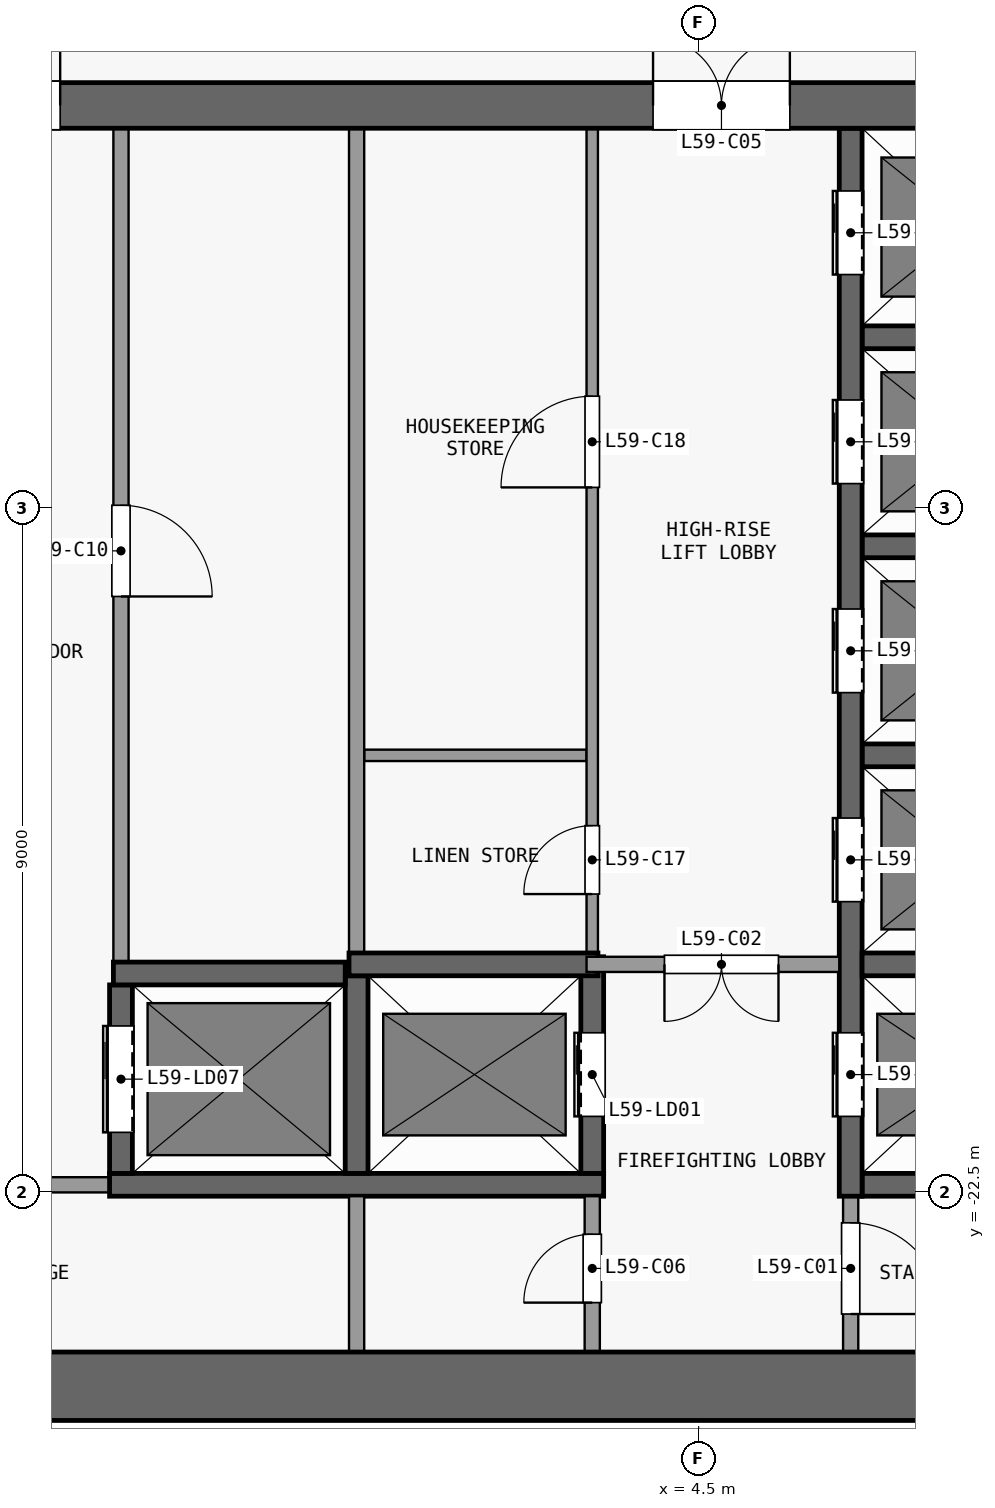
"""IFC4 building model, lengths in metres.
Left out: names, types, materials, properties, quantities, classifications, styles, units other than length and angle.
Written with IfcOpenShell. Run it as: python <this file> out.ifc"""

import sys

from ifc_helpers import new_model, si_unit, direction, frame, frame_2d, origin, place, context, subcontext, project, spatial, rectangle, extrude, element, fill, save


model = new_model("IFC4")
c1 = context("Model", 3, precision=1e-05, world=origin(), true_north=direction((0.0, 1.0)))
c2 = subcontext(c1, "Body", "Model", "MODEL_VIEW")
j1 = project(units=[si_unit("LENGTHUNIT", "METRE"), si_unit("PLANEANGLEUNIT", "RADIAN")], contexts=[c1])
p1 = place(None, origin())
s1 = spatial("IfcSite", under=j1, at=p1, CompositionType="ELEMENT")
p2 = place(p1, origin())
s2 = spatial("IfcBuilding", under=s1, at=p2, CompositionType="ELEMENT")
p3 = place(p2, frame((0.0, 0.0, 233.9)))
s3 = spatial("IfcBuildingStorey", under=s2, at=p3, CompositionType="ELEMENT", Elevation=233.9)
p4 = place(p3, frame((-13.2, -25.05, 0.0), z_axis=(0.0, 0.0, 1.0), x_axis=(1.0, 0.0, 0.0)))
e1 = element("IfcWall", 1, at=p4, inside=s3, PredefinedType="SHEAR", context=c2, shape_type="SweptSolid", body=[
    extrude(rectangle(XDim=26.4, YDim=0.9, at=frame_2d((13.2, 0.0))), origin(), (0.0, 0.0, 1.0), 3.3),
])
p5 = place(p3, frame((-13.2, -8.2, 0.0), z_axis=(0.0, 0.0, 1.0), x_axis=(1.0, 0.0, 0.0)))
e2 = element("IfcWall", 2, at=p5, inside=s3, PredefinedType="SHEAR", context=c2, shape_type="SweptSolid", body=[
    extrude(rectangle(XDim=26.4, YDim=0.6, at=frame_2d((13.2, 0.0))), origin(), (0.0, 0.0, 1.0), 3.3),
])
p6 = place(p5, frame((7.5, 0.0, 0.0)))
e3 = element("IfcOpeningElement", 3, at=p6, cuts=e2, PredefinedType="OPENING", context=c2, shape_type="SweptSolid", body=[
    extrude(rectangle(XDim=1.8, YDim=2.1, at=frame_2d((0.9, 1.05))), frame((0.0, 0.31, 0.0), z_axis=(0.0, -1.0, 0.0), x_axis=(1.0, 0.0, 0.0)), (0.0, 0.0, 1.0), 0.62),
])
p7 = place(p5, frame((17.1, 0.0, 0.0)))
e4 = element("IfcOpeningElement", 4, at=p7, cuts=e2, PredefinedType="OPENING", context=c2, shape_type="SweptSolid", body=[
    extrude(rectangle(XDim=1.8, YDim=2.1, at=frame_2d((0.9, 1.05))), frame((0.0, 0.31, 0.0), z_axis=(0.0, -1.0, 0.0), x_axis=(1.0, 0.0, 0.0)), (0.0, 0.0, 1.0), 0.62),
])
p8 = place(p5, frame((2.425, 0.0, 0.0)))
e5 = element("IfcOpeningElement", 5, at=p8, cuts=e2, PredefinedType="OPENING", context=c2, shape_type="SweptSolid", body=[
    extrude(rectangle(XDim=0.9, YDim=2.1, at=frame_2d((0.45, 1.05))), frame((0.0, 0.31, 0.0), z_axis=(0.0, -1.0, 0.0), x_axis=(1.0, 0.0, 0.0)), (0.0, 0.0, 1.0), 0.62),
])
p9 = place(p5, frame((23.075, 0.0, 0.0)))
e6 = element("IfcOpeningElement", 6, at=p9, cuts=e2, PredefinedType="OPENING", context=c2, shape_type="SweptSolid", body=[
    extrude(rectangle(XDim=0.9, YDim=2.1, at=frame_2d((0.45, 1.05))), frame((0.0, 0.31, 0.0), z_axis=(0.0, -1.0, 0.0), x_axis=(1.0, 0.0, 0.0)), (0.0, 0.0, 1.0), 0.62),
])
p10 = place(p3, frame((-3.25, -22.4, 0.0), z_axis=(0.0, 0.0, 1.0), x_axis=(-1.0, 0.0, 0.0)))
e7 = element("IfcWall", 7, at=p10, inside=s3, PredefinedType="PARTITIONING", context=c2, shape_type="SweptSolid", body=[
    extrude(rectangle(XDim=6.2, YDim=0.2, at=frame_2d((3.1, 0.0))), origin(), (0.0, 0.0, 1.0), 3.3),
])
p11 = place(p10, frame((0.8, 0.0, 0.0)))
e8 = element("IfcOpeningElement", 8, at=p11, cuts=e7, PredefinedType="OPENING", context=c2, shape_type="SweptSolid", body=[
    extrude(rectangle(XDim=1.5, YDim=2.1, at=frame_2d((0.75, 1.05))), frame((0.0, 0.11, 0.0), z_axis=(0.0, -1.0, 0.0), x_axis=(1.0, 0.0, 0.0)), (0.0, 0.0, 1.0), 0.22),
])
p12 = place(p3, frame((-3.25, -22.4, 0.0), z_axis=(0.0, 0.0, 1.0), x_axis=(1.0, 0.0, 0.0)))
e9 = element("IfcWall", 9, at=p12, inside=s3, PredefinedType="SHEAR", context=c2, shape_type="SweptSolid", body=[
    extrude(rectangle(XDim=6.5, YDim=0.3, at=frame_2d((3.25, 0.0))), origin(), (0.0, 0.0, 1.0), 3.3),
])
p13 = place(p3, frame((6.65, -22.4, 0.0), z_axis=(0.0, 0.0, 1.0), x_axis=(1.0, 0.0, 0.0)))
e10 = element("IfcWall", 10, at=p13, inside=s3, PredefinedType="SHEAR", context=c2, shape_type="SweptSolid", body=[
    extrude(rectangle(XDim=2.8, YDim=0.3, at=frame_2d((1.4, 0.0))), origin(), (0.0, 0.0, 1.0), 3.3),
])
p14 = place(p3, frame((-3.2, -19.62, 0.0), z_axis=(0.0, 0.0, 1.0), x_axis=(1.0, 0.0, 0.0)))
e11 = element("IfcWall", 11, at=p14, inside=s3, PredefinedType="SHEAR", context=c2, shape_type="SweptSolid", body=[
    extrude(rectangle(XDim=3.05, YDim=0.3, at=frame_2d((1.525, 0.0))), origin(), (0.0, 0.0, 1.0), 3.3),
])
p15 = place(p3, frame((-0.1, -19.5, 0.0), z_axis=(0.0, 0.0, 1.0), x_axis=(1.0, 0.0, 0.0)))
e12 = element("IfcWall", 12, at=p15, inside=s3, PredefinedType="SHEAR", context=c2, shape_type="SweptSolid", body=[
    extrude(rectangle(XDim=3.275, YDim=0.3, at=frame_2d((1.638, 0.0))), origin(), (0.0, 0.0, 1.0), 3.3),
])
p16 = place(p3, frame((6.35, -19.5, 0.0), z_axis=(0.0, 0.0, 1.0), x_axis=(-1.0, 0.0, 0.0)))
e13 = element("IfcWall", 13, at=p16, inside=s3, PredefinedType="PARTITIONING", context=c2, shape_type="SweptSolid", body=[
    extrude(rectangle(XDim=3.325, YDim=0.2, at=frame_2d((1.663, 0.0))), origin(), (0.0, 0.0, 1.0), 3.3),
])
p17 = place(p16, frame((0.8, 0.0, 0.0)))
e14 = element("IfcOpeningElement", 14, at=p17, cuts=e13, PredefinedType="OPENING", context=c2, shape_type="SweptSolid", body=[
    extrude(rectangle(XDim=1.5, YDim=2.1, at=frame_2d((0.75, 1.05))), frame((0.0, 0.11, 0.0), z_axis=(0.0, -1.0, 0.0), x_axis=(1.0, 0.0, 0.0)), (0.0, 0.0, 1.0), 0.22),
])
p18 = place(p3, frame((6.65, -19.5, 0.0), z_axis=(0.0, 0.0, 1.0), x_axis=(1.0, 0.0, 0.0)))
e15 = element("IfcWall", 15, at=p18, inside=s3, PredefinedType="SHEAR", context=c2, shape_type="SweptSolid", body=[
    extrude(rectangle(XDim=2.8, YDim=0.3, at=frame_2d((1.4, 0.0))), origin(), (0.0, 0.0, 1.0), 3.3),
])
p19 = place(p3, frame((0.1, -16.75, 0.0), z_axis=(0.0, 0.0, 1.0), x_axis=(1.0, 0.0, 0.0)))
e16 = element("IfcWall", 16, at=p19, inside=s3, PredefinedType="PARTITIONING", context=c2, shape_type="SweptSolid", body=[
    extrude(rectangle(XDim=2.925, YDim=0.15, at=frame_2d((1.462, 0.0))), origin(), (0.0, 0.0, 1.0), 3.3),
])
for number, where, z_axis, x_axis in (
    (17, (6.65, -16.75, 0.0), (0.0, 0.0, 1.0), (1.0, 0.0, 0.0)),
    (18, (6.65, -14.0, 0.0), (0.0, 0.0, 1.0), (1.0, 0.0, 0.0)),
    (19, (6.65, -11.25, 0.0), (0.0, 0.0, 1.0), (1.0, 0.0, 0.0)),
):
    element("IfcWall", number, at=place(p3, frame(where, z_axis=z_axis, x_axis=x_axis)), inside=s3, PredefinedType="SHEAR", context=c2, shape_type="SweptSolid", body=[
        extrude(rectangle(XDim=2.8, YDim=0.3, at=frame_2d((1.4, 0.0))), origin(), (0.0, 0.0, 1.0), 3.3),
    ])
p20 = place(p3, frame((-3.1, -22.25, 0.0), z_axis=(0.0, 0.0, 1.0), x_axis=(0.0, 1.0, 0.0)))
e20 = element("IfcWall", 20, at=p20, inside=s3, PredefinedType="SHEAR", context=c2, shape_type="SweptSolid", body=[
    extrude(rectangle(XDim=2.48, YDim=0.3, at=frame_2d((1.24, 0.0))), origin(), (0.0, 0.0, 1.0), 3.3),
])
p21 = place(p20, frame((0.54, 0.0, 0.0)))
e21 = element("IfcOpeningElement", 21, at=p21, cuts=e20, PredefinedType="OPENING", context=c2, shape_type="SweptSolid", body=[
    extrude(rectangle(XDim=1.4, YDim=2.1, at=frame_2d((0.7, 1.05))), frame((0.0, 0.16, 0.0), z_axis=(0.0, -1.0, 0.0), x_axis=(1.0, 0.0, 0.0)), (0.0, 0.0, 1.0), 0.32),
])
p22 = place(p3, frame((-3.1, -8.5, 0.0), z_axis=(0.0, 0.0, 1.0), x_axis=(0.0, -1.0, 0.0)))
e22 = element("IfcWall", 22, at=p22, inside=s3, PredefinedType="PARTITIONING", context=c2, shape_type="SweptSolid", body=[
    extrude(rectangle(XDim=10.97, YDim=0.2, at=frame_2d((5.485, 0.0))), origin(), (0.0, 0.0, 1.0), 3.3),
])
p23 = place(p22, frame((4.96, 0.0, 0.0)))
e23 = element("IfcOpeningElement", 23, at=p23, cuts=e22, PredefinedType="OPENING", context=c2, shape_type="SweptSolid", body=[
    extrude(rectangle(XDim=1.2, YDim=2.1, at=frame_2d((0.6, 1.05))), frame((0.0, 0.11, 0.0), z_axis=(0.0, -1.0, 0.0), x_axis=(1.0, 0.0, 0.0)), (0.0, 0.0, 1.0), 0.22),
])
p24 = place(p3, frame((0.0, -24.6, 0.0), z_axis=(0.0, 0.0, 1.0), x_axis=(0.0, 1.0, 0.0)))
e24 = element("IfcWall", 24, at=p24, inside=s3, PredefinedType="PARTITIONING", context=c2, shape_type="SweptSolid", body=[
    extrude(rectangle(XDim=2.05, YDim=0.2, at=frame_2d((1.025, 0.0))), origin(), (0.0, 0.0, 1.0), 3.3),
])
p25 = place(p3, frame((0.0, -22.25, 0.0), z_axis=(0.0, 0.0, 1.0), x_axis=(0.0, 1.0, 0.0)))
e25 = element("IfcWall", 25, at=p25, inside=s3, PredefinedType="SHEAR", context=c2, shape_type="SweptSolid", body=[
    extrude(rectangle(XDim=2.6, YDim=0.3, at=frame_2d((1.3, 0.0))), origin(), (0.0, 0.0, 1.0), 3.3),
])
p26 = place(p3, frame((0.0, -19.35, 0.0), z_axis=(0.0, 0.0, 1.0), x_axis=(0.0, 1.0, 0.0)))
e26 = element("IfcWall", 26, at=p26, inside=s3, PredefinedType="PARTITIONING", context=c2, shape_type="SweptSolid", body=[
    extrude(rectangle(XDim=10.85, YDim=0.2, at=frame_2d((5.425, 0.0))), origin(), (0.0, 0.0, 1.0), 3.3),
])
p27 = place(p3, frame((3.1, -24.6, 0.0), z_axis=(0.0, 0.0, 1.0), x_axis=(0.0, 1.0, 0.0)))
e27 = element("IfcWall", 27, at=p27, inside=s3, PredefinedType="PARTITIONING", context=c2, shape_type="SweptSolid", body=[
    extrude(rectangle(XDim=2.05, YDim=0.2, at=frame_2d((1.025, 0.0))), origin(), (0.0, 0.0, 1.0), 3.3),
])
p28 = place(p27, frame((0.65, 0.0, 0.0)))
e28 = element("IfcOpeningElement", 28, at=p28, cuts=e27, PredefinedType="OPENING", context=c2, shape_type="SweptSolid", body=[
    extrude(rectangle(XDim=0.9, YDim=2.1, at=frame_2d((0.45, 1.05))), frame((0.0, 0.11, 0.0), z_axis=(0.0, -1.0, 0.0), x_axis=(1.0, 0.0, 0.0)), (0.0, 0.0, 1.0), 0.22),
])
p29 = place(p3, frame((3.1, -22.25, 0.0), z_axis=(0.0, 0.0, 1.0), x_axis=(0.0, 1.0, 0.0)))
e29 = element("IfcWall", 29, at=p29, inside=s3, PredefinedType="SHEAR", context=c2, shape_type="SweptSolid", body=[
    extrude(rectangle(XDim=2.85, YDim=0.3, at=frame_2d((1.425, 0.0))), origin(), (0.0, 0.0, 1.0), 3.3),
])
p30 = place(p29, frame((0.75, 0.0, 0.0)))
e30 = element("IfcOpeningElement", 30, at=p30, cuts=e29, PredefinedType="OPENING", context=c2, shape_type="SweptSolid", body=[
    extrude(rectangle(XDim=1.1, YDim=2.1, at=frame_2d((0.55, 1.05))), frame((0.0, 0.16, 0.0), z_axis=(0.0, -1.0, 0.0), x_axis=(1.0, 0.0, 0.0)), (0.0, 0.0, 1.0), 0.32),
])
p31 = place(p3, frame((3.1, -19.4, 0.0), z_axis=(0.0, 0.0, 1.0), x_axis=(0.0, 1.0, 0.0)))
e31 = element("IfcWall", 31, at=p31, inside=s3, PredefinedType="PARTITIONING", context=c2, shape_type="SweptSolid", body=[
    extrude(rectangle(XDim=10.9, YDim=0.15, at=frame_2d((5.45, 0.0))), origin(), (0.0, 0.0, 1.0), 3.3),
])
p32 = place(p31, frame((0.825, 0.0, 0.0)))
e32 = element("IfcOpeningElement", 32, at=p32, cuts=e31, PredefinedType="OPENING", context=c2, shape_type="SweptSolid", body=[
    extrude(rectangle(XDim=0.9, YDim=2.1, at=frame_2d((0.45, 1.05))), frame((0.0, 0.085, 0.0), z_axis=(0.0, -1.0, 0.0), x_axis=(1.0, 0.0, 0.0)), (0.0, 0.0, 1.0), 0.17),
])
p33 = place(p31, frame((6.175, 0.0, 0.0)))
e33 = element("IfcOpeningElement", 33, at=p33, cuts=e31, PredefinedType="OPENING", context=c2, shape_type="SweptSolid", body=[
    extrude(rectangle(XDim=1.2, YDim=2.1, at=frame_2d((0.6, 1.05))), frame((0.0, 0.085, 0.0), z_axis=(0.0, -1.0, 0.0), x_axis=(1.0, 0.0, 0.0)), (0.0, 0.0, 1.0), 0.17),
])
p34 = place(p3, frame((6.5, -22.55, 0.0), z_axis=(0.0, 0.0, 1.0), x_axis=(0.0, -1.0, 0.0)))
e34 = element("IfcWall", 34, at=p34, inside=s3, PredefinedType="PARTITIONING", context=c2, shape_type="SweptSolid", body=[
    extrude(rectangle(XDim=2.05, YDim=0.2, at=frame_2d((1.025, 0.0))), origin(), (0.0, 0.0, 1.0), 3.3),
])
p35 = place(p34, frame((0.35, 0.0, 0.0)))
e35 = element("IfcOpeningElement", 35, at=p35, cuts=e34, PredefinedType="OPENING", context=c2, shape_type="SweptSolid", body=[
    extrude(rectangle(XDim=1.2, YDim=2.1, at=frame_2d((0.6, 1.05))), frame((0.0, 0.11, 0.0), z_axis=(0.0, -1.0, 0.0), x_axis=(1.0, 0.0, 0.0)), (0.0, 0.0, 1.0), 0.22),
])
p36 = place(p3, frame((6.5, -22.55, 0.0), z_axis=(0.0, 0.0, 1.0), x_axis=(0.0, 1.0, 0.0)))
e36 = element("IfcWall", 36, at=p36, inside=s3, PredefinedType="SHEAR", context=c2, shape_type="SweptSolid", body=[
    extrude(rectangle(XDim=14.05, YDim=0.3, at=frame_2d((7.025, 0.0))), origin(), (0.0, 0.0, 1.0), 3.3),
])
p37 = place(p36, frame((1.05, 0.0, 0.0)))
e37 = element("IfcOpeningElement", 37, at=p37, cuts=e36, PredefinedType="OPENING", context=c2, shape_type="SweptSolid", body=[
    extrude(rectangle(XDim=1.1, YDim=2.1, at=frame_2d((0.55, 1.05))), frame((0.0, 0.16, 0.0), z_axis=(0.0, -1.0, 0.0), x_axis=(1.0, 0.0, 0.0)), (0.0, 0.0, 1.0), 0.32),
])
p38 = place(p36, frame((3.875, 0.0, 0.0)))
e38 = element("IfcOpeningElement", 38, at=p38, cuts=e36, PredefinedType="OPENING", context=c2, shape_type="SweptSolid", body=[
    extrude(rectangle(XDim=1.1, YDim=2.1, at=frame_2d((0.55, 1.05))), frame((0.0, 0.16, 0.0), z_axis=(0.0, -1.0, 0.0), x_axis=(1.0, 0.0, 0.0)), (0.0, 0.0, 1.0), 0.32),
])
p39 = place(p36, frame((6.625, 0.0, 0.0)))
e39 = element("IfcOpeningElement", 39, at=p39, cuts=e36, PredefinedType="OPENING", context=c2, shape_type="SweptSolid", body=[
    extrude(rectangle(XDim=1.1, YDim=2.1, at=frame_2d((0.55, 1.05))), frame((0.0, 0.16, 0.0), z_axis=(0.0, -1.0, 0.0), x_axis=(1.0, 0.0, 0.0)), (0.0, 0.0, 1.0), 0.32),
])
p40 = place(p36, frame((9.375, 0.0, 0.0)))
e40 = element("IfcOpeningElement", 40, at=p40, cuts=e36, PredefinedType="OPENING", context=c2, shape_type="SweptSolid", body=[
    extrude(rectangle(XDim=1.1, YDim=2.1, at=frame_2d((0.55, 1.05))), frame((0.0, 0.16, 0.0), z_axis=(0.0, -1.0, 0.0), x_axis=(1.0, 0.0, 0.0)), (0.0, 0.0, 1.0), 0.32),
])
p41 = place(p36, frame((12.125, 0.0, 0.0)))
e41 = element("IfcOpeningElement", 41, at=p41, cuts=e36, PredefinedType="OPENING", context=c2, shape_type="SweptSolid", body=[
    extrude(rectangle(XDim=1.1, YDim=2.1, at=frame_2d((0.55, 1.05))), frame((0.0, 0.16, 0.0), z_axis=(0.0, -1.0, 0.0), x_axis=(1.0, 0.0, 0.0)), (0.0, 0.0, 1.0), 0.32),
])
p42 = place(p30, origin())
e42 = element("IfcDoor", 42, at=p42, inside=s3, OperationType="DOUBLE_DOOR_SLIDING", PredefinedType="DOOR", context=c2, shape_type="SweptSolid", body=[
    extrude(rectangle(XDim=1.1, YDim=2.1, at=frame_2d((0.55, 1.05))), frame((0.0, 0.025, 0.0), z_axis=(0.0, -1.0, 0.0), x_axis=(1.0, 0.0, 0.0)), (0.0, 0.0, 1.0), 0.05),
])
fill(e30, e42)
p43 = place(p37, origin())
e43 = element("IfcDoor", 43, at=p43, inside=s3, OperationType="DOUBLE_DOOR_SLIDING", PredefinedType="DOOR", context=c2, shape_type="SweptSolid", body=[
    extrude(rectangle(XDim=1.1, YDim=2.1, at=frame_2d((0.55, 1.05))), frame((0.0, 0.025, 0.0), z_axis=(0.0, -1.0, 0.0), x_axis=(1.0, 0.0, 0.0)), (0.0, 0.0, 1.0), 0.05),
])
fill(e37, e43)
p44 = place(p38, origin())
e44 = element("IfcDoor", 44, at=p44, inside=s3, OperationType="DOUBLE_DOOR_SLIDING", PredefinedType="DOOR", context=c2, shape_type="SweptSolid", body=[
    extrude(rectangle(XDim=1.1, YDim=2.1, at=frame_2d((0.55, 1.05))), frame((0.0, 0.025, 0.0), z_axis=(0.0, -1.0, 0.0), x_axis=(1.0, 0.0, 0.0)), (0.0, 0.0, 1.0), 0.05),
])
fill(e38, e44)
p45 = place(p39, origin())
e45 = element("IfcDoor", 45, at=p45, inside=s3, OperationType="DOUBLE_DOOR_SLIDING", PredefinedType="DOOR", context=c2, shape_type="SweptSolid", body=[
    extrude(rectangle(XDim=1.1, YDim=2.1, at=frame_2d((0.55, 1.05))), frame((0.0, 0.025, 0.0), z_axis=(0.0, -1.0, 0.0), x_axis=(1.0, 0.0, 0.0)), (0.0, 0.0, 1.0), 0.05),
])
fill(e39, e45)
p46 = place(p40, origin())
e46 = element("IfcDoor", 46, at=p46, inside=s3, OperationType="DOUBLE_DOOR_SLIDING", PredefinedType="DOOR", context=c2, shape_type="SweptSolid", body=[
    extrude(rectangle(XDim=1.1, YDim=2.1, at=frame_2d((0.55, 1.05))), frame((0.0, 0.025, 0.0), z_axis=(0.0, -1.0, 0.0), x_axis=(1.0, 0.0, 0.0)), (0.0, 0.0, 1.0), 0.05),
])
fill(e40, e46)
p47 = place(p41, origin())
e47 = element("IfcDoor", 47, at=p47, inside=s3, OperationType="DOUBLE_DOOR_SLIDING", PredefinedType="DOOR", context=c2, shape_type="SweptSolid", body=[
    extrude(rectangle(XDim=1.1, YDim=2.1, at=frame_2d((0.55, 1.05))), frame((0.0, 0.025, 0.0), z_axis=(0.0, -1.0, 0.0), x_axis=(1.0, 0.0, 0.0)), (0.0, 0.0, 1.0), 0.05),
])
fill(e41, e47)
p48 = place(p21, origin())
e48 = element("IfcDoor", 48, at=p48, inside=s3, OperationType="DOUBLE_DOOR_SLIDING", PredefinedType="DOOR", context=c2, shape_type="SweptSolid", body=[
    extrude(rectangle(XDim=1.4, YDim=2.1, at=frame_2d((0.7, 1.05))), frame((0.0, 0.025, 0.0), z_axis=(0.0, -1.0, 0.0), x_axis=(1.0, 0.0, 0.0)), (0.0, 0.0, 1.0), 0.05),
])
fill(e21, e48)
p49 = place(p35, origin())
e49 = element("IfcDoor", 49, at=p49, inside=s3, OperationType="SINGLE_SWING_RIGHT", PredefinedType="DOOR", context=c2, shape_type="SweptSolid", body=[
    extrude(rectangle(XDim=1.2, YDim=2.1, at=frame_2d((0.6, 1.05))), frame((0.0, 0.025, 0.0), z_axis=(0.0, -1.0, 0.0), x_axis=(1.0, 0.0, 0.0)), (0.0, 0.0, 1.0), 0.05),
])
fill(e35, e49)
p50 = place(p17, origin())
e50 = element("IfcDoor", 50, at=p50, inside=s3, OperationType="DOUBLE_DOOR_SINGLE_SWING", PredefinedType="DOOR", context=c2, shape_type="SweptSolid", body=[
    extrude(rectangle(XDim=1.5, YDim=2.1, at=frame_2d((0.75, 1.05))), frame((0.0, 0.025, 0.0), z_axis=(0.0, -1.0, 0.0), x_axis=(1.0, 0.0, 0.0)), (0.0, 0.0, 1.0), 0.05),
])
fill(e14, e50)
p51 = place(p6, origin())
e51 = element("IfcDoor", 51, at=p51, inside=s3, OperationType="DOUBLE_DOOR_SINGLE_SWING", PredefinedType="DOOR", context=c2, shape_type="SweptSolid", body=[
    extrude(rectangle(XDim=1.8, YDim=2.1, at=frame_2d((0.9, 1.05))), frame((0.0, 0.025, 0.0), z_axis=(0.0, -1.0, 0.0), x_axis=(1.0, 0.0, 0.0)), (0.0, 0.0, 1.0), 0.05),
])
fill(e3, e51)
p52 = place(p7, origin())
e52 = element("IfcDoor", 52, at=p52, inside=s3, OperationType="DOUBLE_DOOR_SINGLE_SWING", PredefinedType="DOOR", context=c2, shape_type="SweptSolid", body=[
    extrude(rectangle(XDim=1.8, YDim=2.1, at=frame_2d((0.9, 1.05))), frame((0.0, 0.025, 0.0), z_axis=(0.0, -1.0, 0.0), x_axis=(1.0, 0.0, 0.0)), (0.0, 0.0, 1.0), 0.05),
])
fill(e4, e52)
p53 = place(p28, origin())
e53 = element("IfcDoor", 53, at=p53, inside=s3, OperationType="SINGLE_SWING_LEFT", PredefinedType="DOOR", context=c2, shape_type="SweptSolid", body=[
    extrude(rectangle(XDim=0.9, YDim=2.1, at=frame_2d((0.45, 1.05))), frame((0.0, 0.025, 0.0), z_axis=(0.0, -1.0, 0.0), x_axis=(1.0, 0.0, 0.0)), (0.0, 0.0, 1.0), 0.05),
])
fill(e28, e53)
p54 = place(p23, origin())
e54 = element("IfcDoor", 54, at=p54, inside=s3, OperationType="SINGLE_SWING_RIGHT", PredefinedType="DOOR", context=c2, shape_type="SweptSolid", body=[
    extrude(rectangle(XDim=1.2, YDim=2.1, at=frame_2d((0.6, 1.05))), frame((0.0, 0.025, 0.0), z_axis=(0.0, -1.0, 0.0), x_axis=(1.0, 0.0, 0.0)), (0.0, 0.0, 1.0), 0.05),
])
fill(e23, e54)
p55 = place(p32, origin())
e55 = element("IfcDoor", 55, at=p55, inside=s3, OperationType="SINGLE_SWING_LEFT", PredefinedType="DOOR", context=c2, shape_type="SweptSolid", body=[
    extrude(rectangle(XDim=0.9, YDim=2.1, at=frame_2d((0.45, 1.05))), frame((0.0, 0.025, 0.0), z_axis=(0.0, -1.0, 0.0), x_axis=(1.0, 0.0, 0.0)), (0.0, 0.0, 1.0), 0.05),
])
fill(e32, e55)
p56 = place(p33, origin())
e56 = element("IfcDoor", 56, at=p56, inside=s3, OperationType="SINGLE_SWING_LEFT", PredefinedType="DOOR", context=c2, shape_type="SweptSolid", body=[
    extrude(rectangle(XDim=1.2, YDim=2.1, at=frame_2d((0.6, 1.05))), frame((0.0, 0.025, 0.0), z_axis=(0.0, -1.0, 0.0), x_axis=(1.0, 0.0, 0.0)), (0.0, 0.0, 1.0), 0.05),
])
fill(e33, e56)
save(model, sys.argv[1])
